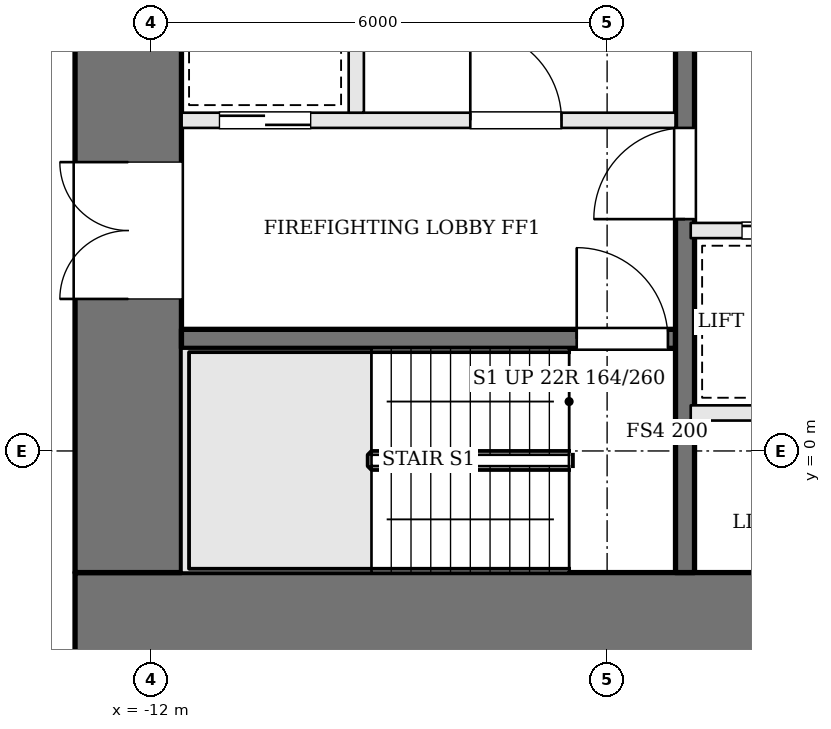
"""IFC4 building model, lengths in metres.
Left out: names, types, materials, properties, quantities, classifications, styles, units other than length and angle.
Written with IfcOpenShell. Run it as: python <this file> out.ifc"""

import sys

from ifc_helpers import new_model, si_unit, direction, frame, frame_2d, origin, place, context, subcontext, project, spatial, rectangle, extrude, element, fill, save


model = new_model("IFC4")
c1 = context("Model", 3, precision=1e-05, world=origin(), true_north=direction((0.0, 1.0)))
c2 = subcontext(c1, "Body", "Model", "MODEL_VIEW")
j1 = project(units=[si_unit("LENGTHUNIT", "METRE"), si_unit("PLANEANGLEUNIT", "RADIAN")], contexts=[c1])
p1 = place(None, origin())
s1 = spatial("IfcSite", under=j1, at=p1, CompositionType="ELEMENT")
p2 = place(p1, origin())
s2 = spatial("IfcBuilding", under=s1, at=p2, CompositionType="ELEMENT")
p3 = place(p2, frame((0.0, 0.0, 44.7)))
s3 = spatial("IfcBuildingStorey", under=s2, at=p3, CompositionType="ELEMENT", Elevation=44.7)
p4 = place(p3, frame((-13.0, -2.3, 0.0), z_axis=(0.0, 0.0, 1.0), x_axis=(1.0, 0.0, 0.0)))
e1 = element("IfcWall", 1, at=p4, inside=s3, PredefinedType="SHEAR", context=c2, shape_type="SweptSolid", body=[
    extrude(rectangle(XDim=26.0, YDim=1.4, at=frame_2d((13.0, 0.0))), origin(), (0.0, 0.0, 1.0), 3.6),
])
p5 = place(p4, frame((9.225, 0.0, 0.0)))
e2 = element("IfcOpeningElement", 2, at=p5, cuts=e1, PredefinedType="OPENING", context=c2, shape_type="SweptSolid", body=[
    extrude(rectangle(XDim=1.0, YDim=2.1, at=frame_2d((0.5, 1.05))), frame((0.0, 0.71, 0.0), z_axis=(0.0, -1.0, 0.0), x_axis=(1.0, 0.0, 0.0)), (0.0, 0.0, 1.0), 1.42),
])
p6 = place(p4, frame((11.825, 0.0, 0.0)))
e3 = element("IfcOpeningElement", 3, at=p6, cuts=e1, PredefinedType="OPENING", context=c2, shape_type="SweptSolid", body=[
    extrude(rectangle(XDim=0.7, YDim=2.1, at=frame_2d((0.35, 1.05))), frame((0.0, 0.71, 0.0), z_axis=(0.0, -1.0, 0.0), x_axis=(1.0, 0.0, 0.0)), (0.0, 0.0, 1.0), 1.42),
])
p7 = place(p4, frame((13.725, 0.0, 0.0)))
e4 = element("IfcOpeningElement", 4, at=p7, cuts=e1, PredefinedType="OPENING", context=c2, shape_type="SweptSolid", body=[
    extrude(rectangle(XDim=1.0, YDim=2.1, at=frame_2d((0.5, 1.05))), frame((0.0, 0.71, 0.0), z_axis=(0.0, -1.0, 0.0), x_axis=(1.0, 0.0, 0.0)), (0.0, 0.0, 1.0), 1.42),
])
p8 = place(p4, frame((16.225, 0.0, 0.0)))
e5 = element("IfcOpeningElement", 5, at=p8, cuts=e1, PredefinedType="OPENING", context=c2, shape_type="SweptSolid", body=[
    extrude(rectangle(XDim=0.9, YDim=2.1, at=frame_2d((0.45, 1.05))), frame((0.0, 0.71, 0.0), z_axis=(0.0, -1.0, 0.0), x_axis=(1.0, 0.0, 0.0)), (0.0, 0.0, 1.0), 1.42),
])
p9 = place(p3, frame((-12.3, -1.6, 0.0), z_axis=(0.0, 0.0, 1.0), x_axis=(0.0, 1.0, 0.0)))
e6 = element("IfcWall", 6, at=p9, inside=s3, PredefinedType="SHEAR", context=c2, shape_type="SweptSolid", body=[
    extrude(rectangle(XDim=12.2, YDim=1.4, at=frame_2d((6.1, 0.0))), origin(), (0.0, 0.0, 1.0), 3.6),
])
p10 = place(p9, frame((3.6, 0.0, 0.0)))
e7 = element("IfcOpeningElement", 7, at=p10, cuts=e6, PredefinedType="OPENING", context=c2, shape_type="SweptSolid", body=[
    extrude(rectangle(XDim=1.8, YDim=2.1, at=frame_2d((0.9, 1.05))), frame((0.0, 0.71, 0.0), z_axis=(0.0, -1.0, 0.0), x_axis=(1.0, 0.0, 0.0)), (0.0, 0.0, 1.0), 1.42),
])
p11 = place(p3, frame((-11.6, 1.475, 0.0), z_axis=(0.0, 0.0, 1.0), x_axis=(1.0, 0.0, 0.0)))
e8 = element("IfcWall", 8, at=p11, inside=s3, PredefinedType="SOLIDWALL", context=c2, shape_type="SweptSolid", body=[
    extrude(rectangle(XDim=6.5, YDim=0.25, at=frame_2d((3.25, 0.0))), origin(), (0.0, 0.0, 1.0), 3.4),
])
p12 = place(p11, frame((5.2, 0.0, 0.0)))
e9 = element("IfcOpeningElement", 9, at=p12, cuts=e8, PredefinedType="OPENING", context=c2, shape_type="SweptSolid", body=[
    extrude(rectangle(XDim=1.2, YDim=2.1, at=frame_2d((0.6, 1.05))), frame((0.0, 0.135, 0.0), z_axis=(0.0, -1.0, 0.0), x_axis=(1.0, 0.0, 0.0)), (0.0, 0.0, 1.0), 0.27),
])
p13 = place(p3, frame((-11.6, 4.35, 0.0), z_axis=(0.0, 0.0, 1.0), x_axis=(1.0, 0.0, 0.0)))
e10 = element("IfcWall", 10, at=p13, inside=s3, PredefinedType="SOLIDWALL", context=c2, shape_type="SweptSolid", body=[
    extrude(rectangle(XDim=6.5, YDim=0.2, at=frame_2d((3.25, 0.0))), origin(), (0.0, 0.0, 1.0), 3.4),
])
p14 = place(p13, frame((3.8, 0.0, 0.0)))
e11 = element("IfcOpeningElement", 11, at=p14, cuts=e10, PredefinedType="OPENING", context=c2, shape_type="SweptSolid", body=[
    extrude(rectangle(XDim=1.2, YDim=2.1, at=frame_2d((0.6, 1.05))), frame((0.0, 0.11, 0.0), z_axis=(0.0, -1.0, 0.0), x_axis=(1.0, 0.0, 0.0)), (0.0, 0.0, 1.0), 0.22),
])
p15 = place(p13, frame((0.5, 0.0, 0.0)))
e12 = element("IfcOpeningElement", 12, at=p15, cuts=e10, PredefinedType="OPENING", context=c2, shape_type="SweptSolid", body=[
    extrude(rectangle(XDim=1.2, YDim=2.1, at=frame_2d((0.6, 1.05))), frame((0.0, 0.11, 0.0), z_axis=(0.0, -1.0, 0.0), x_axis=(1.0, 0.0, 0.0)), (0.0, 0.0, 1.0), 0.22),
])
p16 = place(p3, frame((-9.3, 4.45, 0.0), z_axis=(0.0, 0.0, 1.0), x_axis=(0.0, 1.0, 0.0)))
e13 = element("IfcWall", 13, at=p16, inside=s3, PredefinedType="SOLIDWALL", context=c2, shape_type="SweptSolid", body=[
    extrude(rectangle(XDim=3.0, YDim=0.2, at=frame_2d((1.5, 0.0))), origin(), (0.0, 0.0, 1.0), 3.4),
])
p17 = place(p3, frame((-4.975, -1.6, 0.0), z_axis=(0.0, 0.0, 1.0), x_axis=(0.0, 1.0, 0.0)))
e14 = element("IfcWall", 14, at=p17, inside=s3, PredefinedType="SOLIDWALL", context=c2, shape_type="SweptSolid", body=[
    extrude(rectangle(XDim=12.2, YDim=0.25, at=frame_2d((6.1, 0.0))), origin(), (0.0, 0.0, 1.0), 3.4),
])
p18 = place(p17, frame((4.65, 0.0, 0.0)))
e15 = element("IfcOpeningElement", 15, at=p18, cuts=e14, PredefinedType="OPENING", context=c2, shape_type="SweptSolid", body=[
    extrude(rectangle(XDim=1.2, YDim=2.1, at=frame_2d((0.6, 1.05))), frame((0.0, 0.135, 0.0), z_axis=(0.0, -1.0, 0.0), x_axis=(1.0, 0.0, 0.0)), (0.0, 0.0, 1.0), 0.27),
])
p19 = place(p3, frame((-4.9, 0.5, 0.0), z_axis=(0.0, 0.0, 1.0), x_axis=(1.0, 0.0, 0.0)))
e16 = element("IfcWall", 16, at=p19, inside=s3, PredefinedType="SOLIDWALL", context=c2, shape_type="SweptSolid", body=[
    extrude(rectangle(XDim=9.8, YDim=0.2, at=frame_2d((4.9, 0.0))), origin(), (0.0, 0.0, 1.0), 3.4),
])
p20 = place(p3, frame((-4.9, 2.9, 0.0), z_axis=(0.0, 0.0, 1.0), x_axis=(1.0, 0.0, 0.0)))
e17 = element("IfcWall", 17, at=p20, inside=s3, PredefinedType="SOLIDWALL", context=c2, shape_type="SweptSolid", body=[
    extrude(rectangle(XDim=9.8, YDim=0.2, at=frame_2d((4.9, 0.0))), origin(), (0.0, 0.0, 1.0), 3.4),
])
p21 = place(p20, frame((0.675, 0.0, 0.0)))
e18 = element("IfcOpeningElement", 18, at=p21, cuts=e17, PredefinedType="OPENING", context=c2, shape_type="SweptSolid", body=[
    extrude(rectangle(XDim=1.1, YDim=2.1, at=frame_2d((0.55, 1.05))), frame((0.0, 0.11, 0.0), z_axis=(0.0, -1.0, 0.0), x_axis=(1.0, 0.0, 0.0)), (0.0, 0.0, 1.0), 0.22),
])
p22 = place(p20, frame((3.125, 0.0, 0.0)))
e19 = element("IfcOpeningElement", 19, at=p22, cuts=e17, PredefinedType="OPENING", context=c2, shape_type="SweptSolid", body=[
    extrude(rectangle(XDim=1.1, YDim=2.1, at=frame_2d((0.55, 1.05))), frame((0.0, 0.11, 0.0), z_axis=(0.0, -1.0, 0.0), x_axis=(1.0, 0.0, 0.0)), (0.0, 0.0, 1.0), 0.22),
])
p23 = place(p10, origin())
e20 = element("IfcDoor", 20, at=p23, inside=s3, OperationType="DOUBLE_DOOR_SINGLE_SWING", PredefinedType="DOOR", context=c2, shape_type="SweptSolid", body=[
    extrude(rectangle(XDim=1.8, YDim=2.1, at=frame_2d((0.9, 1.05))), frame((0.0, 0.025, 0.0), z_axis=(0.0, -1.0, 0.0), x_axis=(1.0, 0.0, 0.0)), (0.0, 0.0, 1.0), 0.05),
])
fill(e7, e20)
p24 = place(p18, origin())
e21 = element("IfcDoor", 21, at=p24, inside=s3, OperationType="SINGLE_SWING_LEFT", PredefinedType="DOOR", context=c2, shape_type="SweptSolid", body=[
    extrude(rectangle(XDim=1.2, YDim=2.1, at=frame_2d((0.6, 1.05))), frame((0.0, 0.025, 0.0), z_axis=(0.0, -1.0, 0.0), x_axis=(1.0, 0.0, 0.0)), (0.0, 0.0, 1.0), 0.05),
])
fill(e15, e21)
p25 = place(p14, origin())
e22 = element("IfcDoor", 22, at=p25, inside=s3, OperationType="SINGLE_SWING_LEFT", PredefinedType="DOOR", context=c2, shape_type="SweptSolid", body=[
    extrude(rectangle(XDim=1.2, YDim=2.1, at=frame_2d((0.6, 1.05))), frame((0.0, 0.025, 0.0), z_axis=(0.0, -1.0, 0.0), x_axis=(1.0, 0.0, 0.0)), (0.0, 0.0, 1.0), 0.05),
])
fill(e11, e22)
p26 = place(p12, origin())
e23 = element("IfcDoor", 23, at=p26, inside=s3, OperationType="SINGLE_SWING_LEFT", PredefinedType="DOOR", context=c2, shape_type="SweptSolid", body=[
    extrude(rectangle(XDim=1.2, YDim=2.1, at=frame_2d((0.6, 1.05))), frame((0.0, 0.025, 0.0), z_axis=(0.0, -1.0, 0.0), x_axis=(1.0, 0.0, 0.0)), (0.0, 0.0, 1.0), 0.05),
])
fill(e9, e23)
p27 = place(p15, origin())
e24 = element("IfcDoor", 24, at=p27, inside=s3, OperationType="SLIDING_TO_RIGHT", PredefinedType="DOOR", context=c2, shape_type="SweptSolid", body=[
    extrude(rectangle(XDim=1.2, YDim=2.1, at=frame_2d((0.6, 1.05))), frame((0.0, 0.025, 0.0), z_axis=(0.0, -1.0, 0.0), x_axis=(1.0, 0.0, 0.0)), (0.0, 0.0, 1.0), 0.05),
])
fill(e12, e24)
p28 = place(p21, origin())
e25 = element("IfcDoor", 25, at=p28, inside=s3, OperationType="SLIDING_TO_RIGHT", PredefinedType="DOOR", context=c2, shape_type="SweptSolid", body=[
    extrude(rectangle(XDim=1.1, YDim=2.1, at=frame_2d((0.55, 1.05))), frame((0.0, 0.025, 0.0), z_axis=(0.0, -1.0, 0.0), x_axis=(1.0, 0.0, 0.0)), (0.0, 0.0, 1.0), 0.05),
])
fill(e18, e25)
save(model, sys.argv[1])
